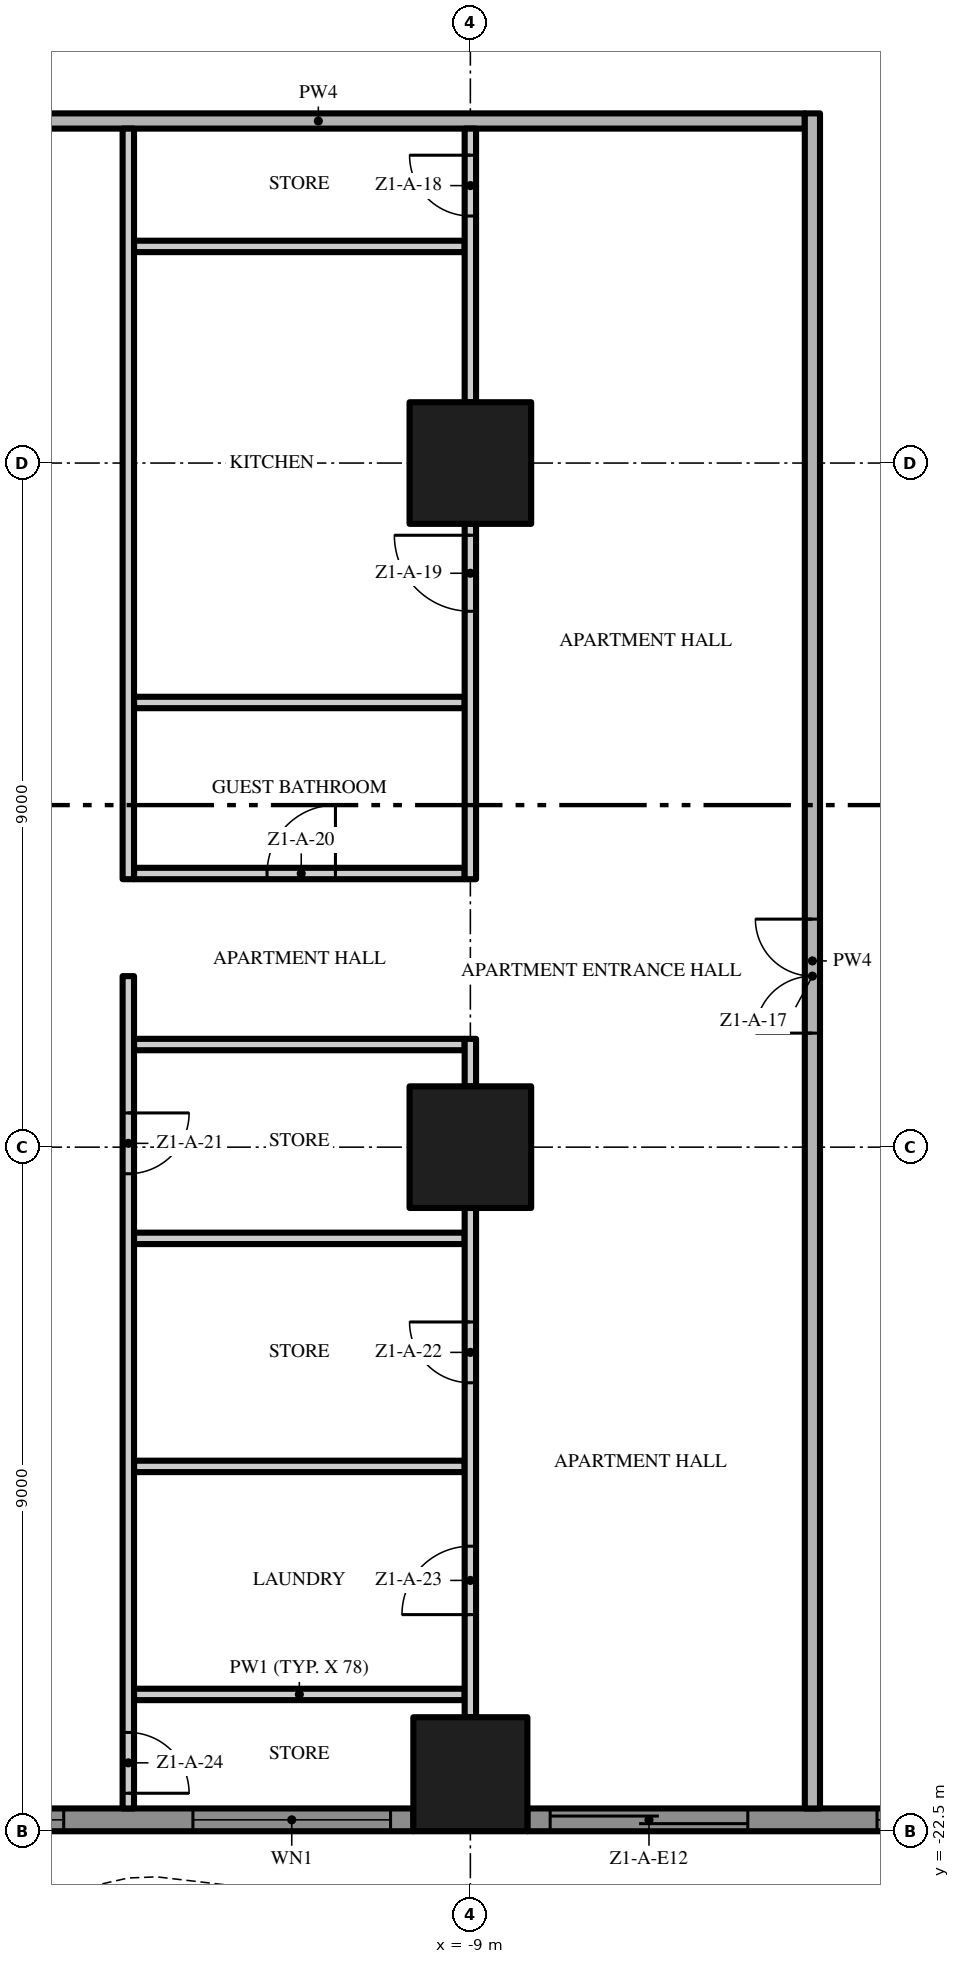
"""IFC4 building model, lengths in metres.
Left out: names, types, materials, properties, quantities, classifications, styles, units other than length and angle.
Written with IfcOpenShell. Run it as: python <this file> out.ifc"""

import sys

from ifc_helpers import new_model, si_unit, direction, frame, frame_2d, origin, origin_2d, place, context, subcontext, project, spatial, polyline, rectangle, outline, extrude, element, fill, save


model = new_model("IFC4")
c1 = context("Model", 3, precision=1e-05, world=origin(), true_north=direction((0.0, 1.0)))
c2 = subcontext(c1, "Body", "Model", "MODEL_VIEW")
j1 = project(units=[si_unit("LENGTHUNIT", "METRE"), si_unit("PLANEANGLEUNIT", "RADIAN")], contexts=[c1])
p1 = place(None, origin())
s1 = spatial("IfcSite", under=j1, at=p1, CompositionType="ELEMENT")
p2 = place(p1, origin())
s2 = spatial("IfcBuilding", under=s1, at=p2, CompositionType="ELEMENT")
p3 = place(p2, frame((0.0, 0.0, 18.8)))
s3 = spatial("IfcBuildingStorey", under=s2, at=p3, CompositionType="ELEMENT", Elevation=18.8)
p4 = place(p3, frame((-9.0, -13.5, 0.0), z_axis=(0.0, 0.0, 1.0), x_axis=(1.0, 0.0, 0.0)))
e1 = element("IfcColumn", 1, at=p4, inside=s3, PredefinedType="COLUMN", context=c2, shape_type="SweptSolid", body=[
    extrude(rectangle(XDim=1.6, YDim=1.6, at=origin_2d()), origin(), (0.0, 0.0, 1.0), 3.5),
])
p5 = place(p3, frame((-9.0, -21.75, 0.0), z_axis=(0.0, 0.0, 1.0), x_axis=(1.0, 0.0, 0.0)))
e2 = element("IfcColumn", 2, at=p5, inside=s3, PredefinedType="COLUMN", context=c2, shape_type="SweptSolid", body=[
    extrude(rectangle(XDim=1.5, YDim=1.5, at=origin_2d()), origin(), (0.0, 0.0, 1.0), 3.5),
])
p6 = place(p3, frame((-9.0, -4.5, 0.0), z_axis=(0.0, 0.0, 1.0), x_axis=(1.0, 0.0, 0.0)))
e3 = element("IfcColumn", 3, at=p6, inside=s3, PredefinedType="COLUMN", context=c2, shape_type="SweptSolid", body=[
    extrude(rectangle(XDim=1.6, YDim=1.6, at=origin_2d()), origin(), (0.0, 0.0, 1.0), 3.5),
])
p7 = place(p3, frame((-9.75, -22.35, 0.0), z_axis=(0.0, 0.0, 1.0), x_axis=(-1.0, 0.0, 0.0)))
e4 = element("IfcWall", 4, at=p7, inside=s3, PredefinedType="SOLIDWALL", context=c2, shape_type="SweptSolid", body=[
    extrude(rectangle(XDim=7.5, YDim=0.3, at=frame_2d((3.75, 0.0))), origin(), (0.0, 0.0, 1.0), 3.5),
])
p8 = place(p7, frame((4.6, 0.0, 0.45)))
e5 = element("IfcOpeningElement", 5, at=p8, cuts=e4, PredefinedType="OPENING", context=c2, shape_type="SweptSolid", body=[
    extrude(rectangle(XDim=2.6, YDim=2.65, at=frame_2d((1.3, 1.325))), frame((0.0, 0.16, 0.0), z_axis=(0.0, -1.0, 0.0), x_axis=(1.0, 0.0, 0.0)), (0.0, 0.0, 1.0), 0.32),
])
p9 = place(p7, frame((0.3, 0.0, 0.45)))
e6 = element("IfcOpeningElement", 6, at=p9, cuts=e4, PredefinedType="OPENING", context=c2, shape_type="SweptSolid", body=[
    extrude(rectangle(XDim=2.6, YDim=2.65, at=frame_2d((1.3, 1.325))), frame((0.0, 0.16, 0.0), z_axis=(0.0, -1.0, 0.0), x_axis=(1.0, 0.0, 0.0)), (0.0, 0.0, 1.0), 0.32),
])
p10 = place(p3, frame((-0.75, -22.35, 0.0), z_axis=(0.0, 0.0, 1.0), x_axis=(-1.0, 0.0, 0.0)))
e7 = element("IfcWall", 7, at=p10, inside=s3, PredefinedType="SOLIDWALL", context=c2, shape_type="SweptSolid", body=[
    extrude(rectangle(XDim=7.5, YDim=0.3, at=frame_2d((3.75, 0.0))), origin(), (0.0, 0.0, 1.0), 3.5),
])
p11 = place(p10, frame((4.6, 0.0, 0.0)))
e8 = element("IfcOpeningElement", 8, at=p11, cuts=e7, PredefinedType="OPENING", context=c2, shape_type="SweptSolid", body=[
    extrude(rectangle(XDim=2.6, YDim=2.4, at=frame_2d((1.3, 1.2))), frame((0.0, 0.16, 0.0), z_axis=(0.0, -1.0, 0.0), x_axis=(1.0, 0.0, 0.0)), (0.0, 0.0, 1.0), 0.32),
])
p12 = place(p10, frame((0.3, 0.0, 0.45)))
e9 = element("IfcOpeningElement", 9, at=p12, cuts=e7, PredefinedType="OPENING", context=c2, shape_type="SweptSolid", body=[
    extrude(rectangle(XDim=2.6, YDim=2.65, at=frame_2d((1.3, 1.325))), frame((0.0, 0.16, 0.0), z_axis=(0.0, -1.0, 0.0), x_axis=(1.0, 0.0, 0.0)), (0.0, 0.0, 1.0), 0.32),
])
p13 = place(p3, origin())
e10 = element("IfcWall", 10, at=p13, inside=s3, PredefinedType="USERDEFINED", context=c2, shape_type="SweptSolid", body=[
    extrude(outline(polyline([(-22.5, -25.149), (-21.0, -25.485), (-20.625, -25.5), (-19.5, -25.369), (-18.0, -24.845), (-16.5, -24.112), (-15.0, -23.451), (-13.5, -23.115), (-13.125, -23.1), (-12.0, -23.231), (-10.5, -23.755), (-9.0, -24.488), (-7.5, -25.149), (-6.0, -25.485), (-5.625, -25.5), (-4.5, -25.369), (-3.0, -24.845), (-1.5, -24.112), (0.0, -23.451), (1.5, -23.115), (1.875, -23.1), (3.0, -23.231), (4.5, -23.755), (6.0, -24.488), (7.5, -25.149), (9.0, -25.485), (9.375, -25.5), (10.5, -25.369), (12.0, -24.845), (13.5, -24.112), (15.0, -23.451), (16.5, -23.115), (16.875, -23.1), (18.0, -23.231), (19.5, -23.755), (21.0, -24.488), (22.5, -25.149), (22.601, -24.92), (21.105, -24.261), (19.596, -23.524), (18.056, -22.986), (16.885, -22.849), (16.467, -22.866), (14.921, -23.213), (13.395, -23.885), (11.904, -24.614), (10.444, -25.124), (9.365, -25.249), (9.033, -25.236), (7.579, -24.91), (6.105, -24.261), (4.596, -23.524), (3.056, -22.986), (1.885, -22.849), (1.467, -22.866), (-0.079, -23.213), (-1.605, -23.885), (-3.096, -24.614), (-4.556, -25.124), (-5.635, -25.249), (-5.967, -25.236), (-7.421, -24.91), (-8.895, -24.261), (-10.404, -23.524), (-11.944, -22.986), (-13.115, -22.849), (-13.533, -22.866), (-15.079, -23.213), (-16.605, -23.885), (-18.096, -24.614), (-19.556, -25.124), (-20.635, -25.249), (-20.967, -25.236), (-22.445, -24.905), (-22.5, -25.149)])), origin(), (0.0, 0.0, 1.0), 0.9),
])
for number, where, z_axis, x_axis in (
    (11, (-13.425, -20.7, 0.0), (0.0, 0.0, 1.0), (1.0, 0.0, 0.0)),
    (12, (-13.425, -17.7, 0.0), (0.0, 0.0, 1.0), (1.0, 0.0, 0.0)),
    (13, (-13.425, -14.7, 0.0), (0.0, 0.0, 1.0), (1.0, 0.0, 0.0)),
    (14, (-13.425, -12.15, 0.0), (0.0, 0.0, 1.0), (1.0, 0.0, 0.0)),
):
    element("IfcWall", number, at=place(p3, frame(where, z_axis=z_axis, x_axis=x_axis)), inside=s3, PredefinedType="PARTITIONING", context=c2, shape_type="SweptSolid", body=[
        extrude(rectangle(XDim=4.35, YDim=0.15, at=frame_2d((2.175, 0.0))), origin(), (0.0, 0.0, 1.0), 3.5),
    ])
p14 = place(p3, frame((-13.425, -9.9, 0.0), z_axis=(0.0, 0.0, 1.0), x_axis=(1.0, 0.0, 0.0)))
e15 = element("IfcWall", 15, at=p14, inside=s3, PredefinedType="PARTITIONING", context=c2, shape_type="SweptSolid", body=[
    extrude(rectangle(XDim=4.35, YDim=0.15, at=frame_2d((2.175, 0.0))), origin(), (0.0, 0.0, 1.0), 3.5),
])
p15 = place(p14, frame((1.75, 0.0, 0.0)))
e16 = element("IfcOpeningElement", 16, at=p15, cuts=e15, PredefinedType="OPENING", context=c2, shape_type="SweptSolid", body=[
    extrude(rectangle(XDim=0.9, YDim=2.1, at=frame_2d((0.45, 1.05))), frame((0.0, 0.085, 0.0), z_axis=(0.0, -1.0, 0.0), x_axis=(1.0, 0.0, 0.0)), (0.0, 0.0, 1.0), 0.17),
])
for number, where, z_axis, x_axis in (
    (17, (-13.425, -7.65, 0.0), (0.0, 0.0, 1.0), (1.0, 0.0, 0.0)),
    (18, (-13.425, -1.65, 0.0), (0.0, 0.0, 1.0), (1.0, 0.0, 0.0)),
):
    element("IfcWall", number, at=place(p3, frame(where, z_axis=z_axis, x_axis=x_axis)), inside=s3, PredefinedType="PARTITIONING", context=c2, shape_type="SweptSolid", body=[
        extrude(rectangle(XDim=4.35, YDim=0.15, at=frame_2d((2.175, 0.0))), origin(), (0.0, 0.0, 1.0), 3.5),
    ])
p16 = place(p3, frame((-17.4, 0.0, 0.0), z_axis=(0.0, 0.0, 1.0), x_axis=(1.0, 0.0, 0.0)))
e19 = element("IfcWall", 19, at=p16, inside=s3, PredefinedType="PARTITIONING", context=c2, shape_type="SweptSolid", body=[
    extrude(rectangle(XDim=12.8, YDim=0.2, at=frame_2d((6.4, 0.0))), origin(), (0.0, 0.0, 1.0), 3.5),
])
p17 = place(p3, frame((-13.5, -11.25, 0.0), z_axis=(0.0, 0.0, 1.0), x_axis=(0.0, -1.0, 0.0)))
e20 = element("IfcWall", 20, at=p17, inside=s3, PredefinedType="PARTITIONING", context=c2, shape_type="SweptSolid", body=[
    extrude(rectangle(XDim=10.95, YDim=0.15, at=frame_2d((5.475, 0.0))), origin(), (0.0, 0.0, 1.0), 3.5),
])
p18 = place(p17, frame((1.8, 0.0, 0.0)))
e21 = element("IfcOpeningElement", 21, at=p18, cuts=e20, PredefinedType="OPENING", context=c2, shape_type="SweptSolid", body=[
    extrude(rectangle(XDim=0.8, YDim=2.0, at=frame_2d((0.4, 1.0))), frame((0.0, 0.085, 0.0), z_axis=(0.0, -1.0, 0.0), x_axis=(1.0, 0.0, 0.0)), (0.0, 0.0, 1.0), 0.17),
])
p19 = place(p17, frame((9.95, 0.0, 0.0)))
e22 = element("IfcOpeningElement", 22, at=p19, cuts=e20, PredefinedType="OPENING", context=c2, shape_type="SweptSolid", body=[
    extrude(rectangle(XDim=0.8, YDim=2.0, at=frame_2d((0.4, 1.0))), frame((0.0, 0.085, 0.0), z_axis=(0.0, -1.0, 0.0), x_axis=(1.0, 0.0, 0.0)), (0.0, 0.0, 1.0), 0.17),
])
p20 = place(p3, frame((-13.5, -9.975, 0.0), z_axis=(0.0, 0.0, 1.0), x_axis=(0.0, 1.0, 0.0)))
e23 = element("IfcWall", 23, at=p20, inside=s3, PredefinedType="PARTITIONING", context=c2, shape_type="SweptSolid", body=[
    extrude(rectangle(XDim=9.875, YDim=0.15, at=frame_2d((4.938, 0.0))), origin(), (0.0, 0.0, 1.0), 3.5),
])
p21 = place(p3, frame((-9.0, -21.0, 0.0), z_axis=(0.0, 0.0, 1.0), x_axis=(0.0, 1.0, 0.0)))
e24 = element("IfcWall", 24, at=p21, inside=s3, PredefinedType="PARTITIONING", context=c2, shape_type="SweptSolid", body=[
    extrude(rectangle(XDim=6.7, YDim=0.15, at=frame_2d((3.35, 0.0))), origin(), (0.0, 0.0, 1.0), 3.5),
])
p22 = place(p21, frame((4.4, 0.0, 0.0)))
e25 = element("IfcOpeningElement", 25, at=p22, cuts=e24, PredefinedType="OPENING", context=c2, shape_type="SweptSolid", body=[
    extrude(rectangle(XDim=0.8, YDim=2.0, at=frame_2d((0.4, 1.0))), frame((0.0, 0.085, 0.0), z_axis=(0.0, -1.0, 0.0), x_axis=(1.0, 0.0, 0.0)), (0.0, 0.0, 1.0), 0.17),
])
p23 = place(p21, frame((1.35, 0.0, 0.0)))
e26 = element("IfcOpeningElement", 26, at=p23, cuts=e24, PredefinedType="OPENING", context=c2, shape_type="SweptSolid", body=[
    extrude(rectangle(XDim=0.9, YDim=2.1, at=frame_2d((0.45, 1.05))), frame((0.0, 0.085, 0.0), z_axis=(0.0, -1.0, 0.0), x_axis=(1.0, 0.0, 0.0)), (0.0, 0.0, 1.0), 0.17),
])
p24 = place(p3, frame((-9.0, -12.7, 0.0), z_axis=(0.0, 0.0, 1.0), x_axis=(0.0, 1.0, 0.0)))
e27 = element("IfcWall", 27, at=p24, inside=s3, PredefinedType="PARTITIONING", context=c2, shape_type="SweptSolid", body=[
    extrude(rectangle(XDim=0.625, YDim=0.15, at=frame_2d((0.312, 0.0))), origin(), (0.0, 0.0, 1.0), 3.5),
])
p25 = place(p3, frame((-9.0, -9.975, 0.0), z_axis=(0.0, 0.0, 1.0), x_axis=(0.0, 1.0, 0.0)))
e28 = element("IfcWall", 28, at=p25, inside=s3, PredefinedType="PARTITIONING", context=c2, shape_type="SweptSolid", body=[
    extrude(rectangle(XDim=4.675, YDim=0.15, at=frame_2d((2.337, 0.0))), origin(), (0.0, 0.0, 1.0), 3.5),
])
p26 = place(p25, frame((3.525, 0.0, 0.0)))
e29 = element("IfcOpeningElement", 29, at=p26, cuts=e28, PredefinedType="OPENING", context=c2, shape_type="SweptSolid", body=[
    extrude(rectangle(XDim=1.0, YDim=2.4, at=frame_2d((0.5, 1.2))), frame((0.0, 0.085, 0.0), z_axis=(0.0, -1.0, 0.0), x_axis=(1.0, 0.0, 0.0)), (0.0, 0.0, 1.0), 0.17),
])
p27 = place(p3, frame((-9.0, -3.7, 0.0), z_axis=(0.0, 0.0, 1.0), x_axis=(0.0, 1.0, 0.0)))
e30 = element("IfcWall", 30, at=p27, inside=s3, PredefinedType="PARTITIONING", context=c2, shape_type="SweptSolid", body=[
    extrude(rectangle(XDim=3.6, YDim=0.15, at=frame_2d((1.8, 0.0))), origin(), (0.0, 0.0, 1.0), 3.5),
])
p28 = place(p27, frame((2.45, 0.0, 0.0)))
e31 = element("IfcOpeningElement", 31, at=p28, cuts=e30, PredefinedType="OPENING", context=c2, shape_type="SweptSolid", body=[
    extrude(rectangle(XDim=0.8, YDim=2.0, at=frame_2d((0.4, 1.0))), frame((0.0, 0.085, 0.0), z_axis=(0.0, -1.0, 0.0), x_axis=(1.0, 0.0, 0.0)), (0.0, 0.0, 1.0), 0.17),
])
p29 = place(p3, frame((-4.5, -22.2, 0.0), z_axis=(0.0, 0.0, 1.0), x_axis=(0.0, 1.0, 0.0)))
e32 = element("IfcWall", 32, at=p29, inside=s3, PredefinedType="PARTITIONING", context=c2, shape_type="SweptSolid", body=[
    extrude(rectangle(XDim=22.3, YDim=0.2, at=frame_2d((11.15, 0.0))), origin(), (0.0, 0.0, 1.0), 3.5),
])
p30 = place(p29, frame((10.2, 0.0, 0.0)))
e33 = element("IfcOpeningElement", 33, at=p30, cuts=e32, PredefinedType="OPENING", context=c2, shape_type="SweptSolid", body=[
    extrude(rectangle(XDim=1.5, YDim=2.4, at=frame_2d((0.75, 1.2))), frame((0.0, 0.11, 0.0), z_axis=(0.0, -1.0, 0.0), x_axis=(1.0, 0.0, 0.0)), (0.0, 0.0, 1.0), 0.22),
])
p31 = place(p8, origin())
e34 = element("IfcWindow", 34, at=p31, inside=s3, PartitioningType="SINGLE_PANEL", PredefinedType="WINDOW", context=c2, shape_type="SweptSolid", body=[
    extrude(rectangle(XDim=2.6, YDim=2.65, at=frame_2d((1.3, 1.325))), frame((0.0, 0.03, 0.0), z_axis=(0.0, -1.0, 0.0), x_axis=(1.0, 0.0, 0.0)), (0.0, 0.0, 1.0), 0.06),
])
fill(e5, e34)
p32 = place(p9, origin())
e35 = element("IfcWindow", 35, at=p32, inside=s3, PartitioningType="SINGLE_PANEL", PredefinedType="WINDOW", context=c2, shape_type="SweptSolid", body=[
    extrude(rectangle(XDim=2.6, YDim=2.65, at=frame_2d((1.3, 1.325))), frame((0.0, 0.03, 0.0), z_axis=(0.0, -1.0, 0.0), x_axis=(1.0, 0.0, 0.0)), (0.0, 0.0, 1.0), 0.06),
])
fill(e6, e35)
p33 = place(p11, origin())
e36 = element("IfcDoor", 36, at=p33, inside=s3, OperationType="SINGLE_SWING_LEFT", PredefinedType="DOOR", context=c2, shape_type="SweptSolid", body=[
    extrude(rectangle(XDim=2.6, YDim=2.4, at=frame_2d((1.3, 1.2))), frame((0.0, 0.025, 0.0), z_axis=(0.0, -1.0, 0.0), x_axis=(1.0, 0.0, 0.0)), (0.0, 0.0, 1.0), 0.05),
])
fill(e8, e36)
p34 = place(p12, origin())
e37 = element("IfcWindow", 37, at=p34, inside=s3, PartitioningType="SINGLE_PANEL", PredefinedType="WINDOW", context=c2, shape_type="SweptSolid", body=[
    extrude(rectangle(XDim=2.6, YDim=2.65, at=frame_2d((1.3, 1.325))), frame((0.0, 0.03, 0.0), z_axis=(0.0, -1.0, 0.0), x_axis=(1.0, 0.0, 0.0)), (0.0, 0.0, 1.0), 0.06),
])
fill(e9, e37)
p35 = place(p30, origin())
e38 = element("IfcDoor", 38, at=p35, inside=s3, OperationType="DOUBLE_DOOR_SINGLE_SWING", PredefinedType="DOOR", context=c2, shape_type="SweptSolid", body=[
    extrude(rectangle(XDim=1.5, YDim=2.4, at=frame_2d((0.75, 1.2))), frame((0.0, 0.025, 0.0), z_axis=(0.0, -1.0, 0.0), x_axis=(1.0, 0.0, 0.0)), (0.0, 0.0, 1.0), 0.05),
])
fill(e33, e38)
p36 = place(p28, origin())
e39 = element("IfcDoor", 39, at=p36, inside=s3, OperationType="SINGLE_SWING_RIGHT", PredefinedType="DOOR", context=c2, shape_type="SweptSolid", body=[
    extrude(rectangle(XDim=0.8, YDim=2.0, at=frame_2d((0.4, 1.0))), frame((0.0, 0.025, 0.0), z_axis=(0.0, -1.0, 0.0), x_axis=(1.0, 0.0, 0.0)), (0.0, 0.0, 1.0), 0.05),
])
fill(e31, e39)
p37 = place(p26, origin())
e40 = element("IfcDoor", 40, at=p37, inside=s3, OperationType="SINGLE_SWING_RIGHT", PredefinedType="DOOR", context=c2, shape_type="SweptSolid", body=[
    extrude(rectangle(XDim=1.0, YDim=2.4, at=frame_2d((0.5, 1.2))), frame((0.0, 0.025, 0.0), z_axis=(0.0, -1.0, 0.0), x_axis=(1.0, 0.0, 0.0)), (0.0, 0.0, 1.0), 0.05),
])
fill(e29, e40)
p38 = place(p15, origin())
e41 = element("IfcDoor", 41, at=p38, inside=s3, OperationType="SINGLE_SWING_RIGHT", PredefinedType="DOOR", context=c2, shape_type="SweptSolid", body=[
    extrude(rectangle(XDim=0.9, YDim=2.1, at=frame_2d((0.45, 1.05))), frame((0.0, 0.025, 0.0), z_axis=(0.0, -1.0, 0.0), x_axis=(1.0, 0.0, 0.0)), (0.0, 0.0, 1.0), 0.05),
])
fill(e16, e41)
p39 = place(p18, origin())
e42 = element("IfcDoor", 42, at=p39, inside=s3, OperationType="SINGLE_SWING_LEFT", PredefinedType="DOOR", context=c2, shape_type="SweptSolid", body=[
    extrude(rectangle(XDim=0.8, YDim=2.0, at=frame_2d((0.4, 1.0))), frame((0.0, 0.025, 0.0), z_axis=(0.0, -1.0, 0.0), x_axis=(1.0, 0.0, 0.0)), (0.0, 0.0, 1.0), 0.05),
])
fill(e21, e42)
p40 = place(p22, origin())
e43 = element("IfcDoor", 43, at=p40, inside=s3, OperationType="SINGLE_SWING_RIGHT", PredefinedType="DOOR", context=c2, shape_type="SweptSolid", body=[
    extrude(rectangle(XDim=0.8, YDim=2.0, at=frame_2d((0.4, 1.0))), frame((0.0, 0.025, 0.0), z_axis=(0.0, -1.0, 0.0), x_axis=(1.0, 0.0, 0.0)), (0.0, 0.0, 1.0), 0.05),
])
fill(e25, e43)
p41 = place(p23, origin())
e44 = element("IfcDoor", 44, at=p41, inside=s3, OperationType="SINGLE_SWING_LEFT", PredefinedType="DOOR", context=c2, shape_type="SweptSolid", body=[
    extrude(rectangle(XDim=0.9, YDim=2.1, at=frame_2d((0.45, 1.05))), frame((0.0, 0.025, 0.0), z_axis=(0.0, -1.0, 0.0), x_axis=(1.0, 0.0, 0.0)), (0.0, 0.0, 1.0), 0.05),
])
fill(e26, e44)
p42 = place(p19, origin())
e45 = element("IfcDoor", 45, at=p42, inside=s3, OperationType="SINGLE_SWING_RIGHT", PredefinedType="DOOR", context=c2, shape_type="SweptSolid", body=[
    extrude(rectangle(XDim=0.8, YDim=2.0, at=frame_2d((0.4, 1.0))), frame((0.0, 0.025, 0.0), z_axis=(0.0, -1.0, 0.0), x_axis=(1.0, 0.0, 0.0)), (0.0, 0.0, 1.0), 0.05),
])
fill(e22, e45)
save(model, sys.argv[1])
